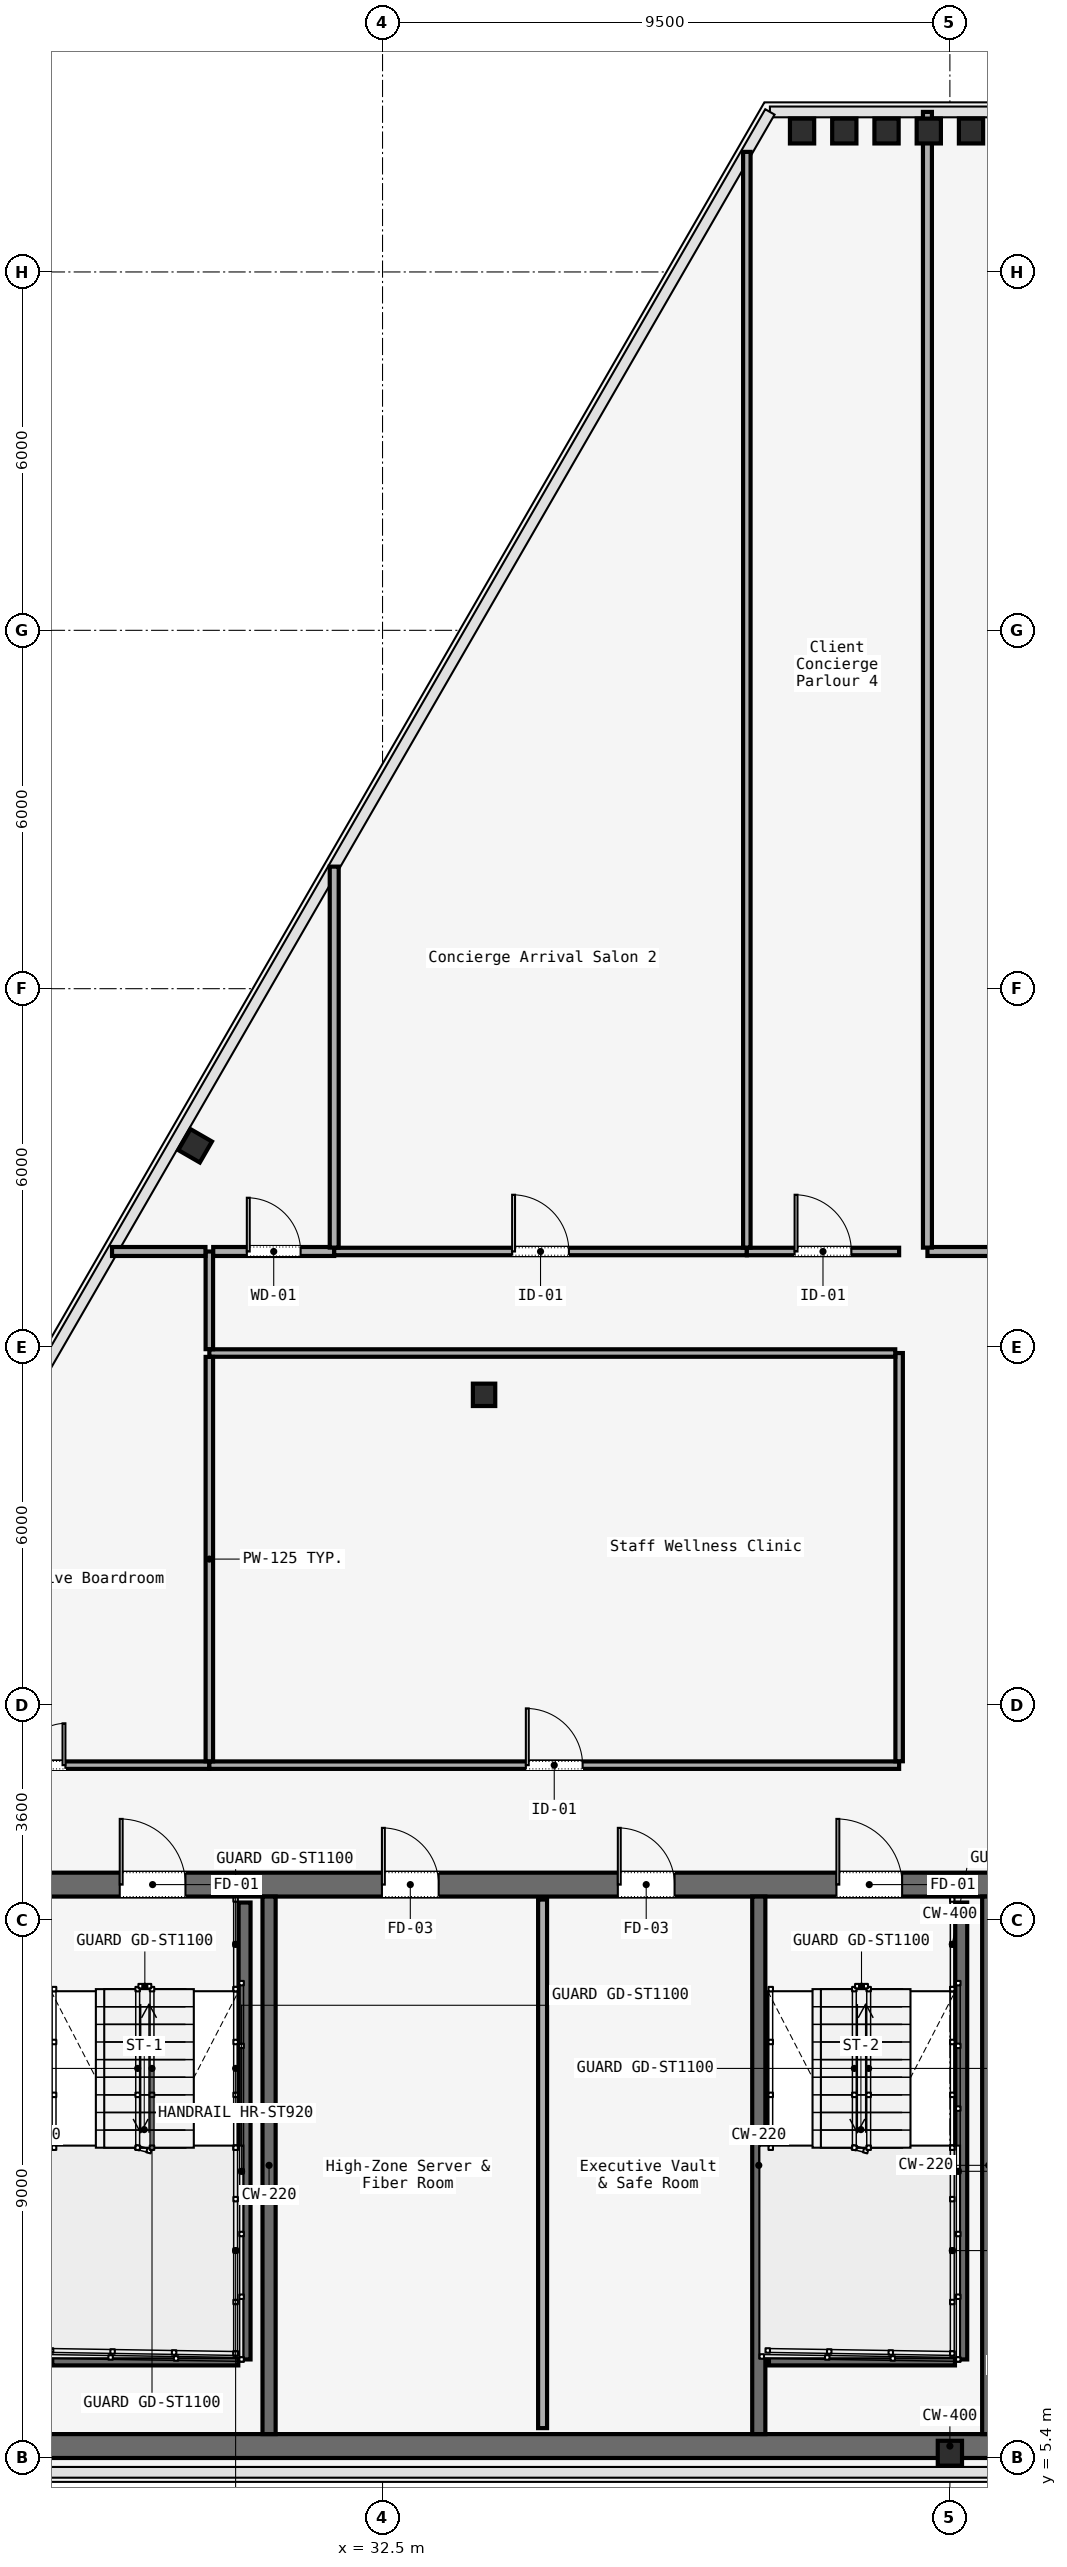
"""IFC4 building model, lengths in metres.
Left out: names, types, materials, properties, quantities, classifications, styles, units other than length and angle.
Written with IfcOpenShell. Run it as: python <this file> out.ifc"""

import sys

from ifc_helpers import new_model, si_unit, direction, frame, frame_2d, origin, origin_2d, place, context, subcontext, project, spatial, rectangle, i_section, extrude, element, fill, save


model = new_model("IFC4")
c1 = context("Model", 3, precision=1e-05, world=origin(), true_north=direction((0.0, 1.0)))
c2 = subcontext(c1, "Body", "Model", "MODEL_VIEW")
j1 = project(units=[si_unit("LENGTHUNIT", "METRE"), si_unit("PLANEANGLEUNIT", "RADIAN")], contexts=[c1])
p1 = place(None, origin())
s1 = spatial("IfcSite", under=j1, at=p1, CompositionType="ELEMENT")
p2 = place(p1, origin())
s2 = spatial("IfcBuilding", under=s1, at=p2, CompositionType="ELEMENT")
p3 = place(p2, frame((0.0, 0.0, 256.0)))
s3 = spatial("IfcBuildingStorey", under=s2, at=p3, CompositionType="ELEMENT", Elevation=256.0)
p4 = place(p3, frame((26.45, 15.0, 0.0), z_axis=(0.0, 0.0, 1.0), x_axis=(1.0, 0.0, 0.0)))
e1 = element("IfcWall", 1, at=p4, inside=s3, PredefinedType="SOLIDWALL", context=c2, shape_type="SweptSolid", body=[
    extrude(rectangle(XDim=31.1, YDim=0.4, at=frame_2d((15.55, 0.0))), origin(), (0.0, 0.0, 1.0), 3.58),
])
p5 = place(p4, frame((1.65, 0.0, 0.0)))
e2 = element("IfcOpeningElement", 2, at=p5, cuts=e1, PredefinedType="OPENING", context=c2, shape_type="SweptSolid", body=[
    extrude(rectangle(XDim=1.1, YDim=2.2, at=frame_2d((0.55, 1.1))), frame((0.0, 0.2, 0.0), z_axis=(0.0, -1.0, 0.0), x_axis=(1.0, 0.0, 0.0)), (0.0, 0.0, 1.0), 0.4),
])
p6 = place(p4, frame((13.65, 0.0, 0.0)))
e3 = element("IfcOpeningElement", 3, at=p6, cuts=e1, PredefinedType="OPENING", context=c2, shape_type="SweptSolid", body=[
    extrude(rectangle(XDim=1.1, YDim=2.2, at=frame_2d((0.55, 1.1))), frame((0.0, 0.2, 0.0), z_axis=(0.0, -1.0, 0.0), x_axis=(1.0, 0.0, 0.0)), (0.0, 0.0, 1.0), 0.4),
])
p7 = place(p4, frame((25.55, 0.0, 0.0)))
e4 = element("IfcOpeningElement", 4, at=p7, cuts=e1, PredefinedType="OPENING", context=c2, shape_type="SweptSolid", body=[
    extrude(rectangle(XDim=1.1, YDim=2.2, at=frame_2d((0.55, 1.1))), frame((0.0, 0.2, 0.0), z_axis=(0.0, -1.0, 0.0), x_axis=(1.0, 0.0, 0.0)), (0.0, 0.0, 1.0), 0.4),
])
p8 = place(p4, frame((19.35, 0.0, 0.0)))
e5 = element("IfcOpeningElement", 5, at=p8, cuts=e1, PredefinedType="OPENING", context=c2, shape_type="SweptSolid", body=[
    extrude(rectangle(XDim=1.1, YDim=2.2, at=frame_2d((0.55, 1.1))), frame((0.0, 0.2, 0.0), z_axis=(0.0, -1.0, 0.0), x_axis=(1.0, 0.0, 0.0)), (0.0, 0.0, 1.0), 0.4),
])
p9 = place(p4, frame((21.4, 0.0, 0.0)))
e6 = element("IfcOpeningElement", 6, at=p9, cuts=e1, PredefinedType="OPENING", context=c2, shape_type="SweptSolid", body=[
    extrude(rectangle(XDim=0.9, YDim=2.1, at=frame_2d((0.45, 1.05))), frame((0.0, 0.2, 0.0), z_axis=(0.0, -1.0, 0.0), x_axis=(1.0, 0.0, 0.0)), (0.0, 0.0, 1.0), 0.4),
])
p10 = place(p4, frame((6.04, 0.0, 0.0)))
e7 = element("IfcOpeningElement", 7, at=p10, cuts=e1, PredefinedType="OPENING", context=c2, shape_type="SweptSolid", body=[
    extrude(rectangle(XDim=0.95, YDim=2.2, at=frame_2d((0.475, 1.1))), frame((0.0, 0.2, 0.0), z_axis=(0.0, -1.0, 0.0), x_axis=(1.0, 0.0, 0.0)), (0.0, 0.0, 1.0), 0.4),
])
p11 = place(p4, frame((9.99, 0.0, 0.0)))
e8 = element("IfcOpeningElement", 8, at=p11, cuts=e1, PredefinedType="OPENING", context=c2, shape_type="SweptSolid", body=[
    extrude(rectangle(XDim=0.95, YDim=2.2, at=frame_2d((0.475, 1.1))), frame((0.0, 0.2, 0.0), z_axis=(0.0, -1.0, 0.0), x_axis=(1.0, 0.0, 0.0)), (0.0, 0.0, 1.0), 0.4),
])
p12 = place(p4, frame((23.35, 0.0, 0.0)))
e9 = element("IfcOpeningElement", 9, at=p12, cuts=e1, PredefinedType="OPENING", context=c2, shape_type="SweptSolid", body=[
    extrude(rectangle(XDim=1.3, YDim=2.3, at=frame_2d((0.65, 1.15))), frame((0.0, 0.2, 0.0), z_axis=(0.0, -1.0, 0.0), x_axis=(1.0, 0.0, 0.0)), (0.0, 0.0, 1.0), 0.4),
])
p13 = place(p3, frame((26.45, 5.6, 0.0), z_axis=(0.0, 0.0, 1.0), x_axis=(1.0, 0.0, 0.0)))
e10 = element("IfcWall", 10, at=p13, inside=s3, PredefinedType="SOLIDWALL", context=c2, shape_type="SweptSolid", body=[
    extrude(rectangle(XDim=31.1, YDim=0.4, at=frame_2d((15.55, 0.0))), origin(), (0.0, 0.0, 1.0), 3.58),
])
for number, where, z_axis, x_axis in (
    (11, (30.6, 5.8, 0.0), (0.0, 0.0, 1.0), (0.0, 1.0, 0.0)),
    (12, (38.8, 5.8, 0.0), (0.0, 0.0, 1.0), (0.0, 1.0, 0.0)),
    (13, (42.65, 5.8, 0.0), (0.0, 0.0, 1.0), (0.0, 1.0, 0.0)),
):
    element("IfcWall", number, at=place(p3, frame(where, z_axis=z_axis, x_axis=x_axis)), inside=s3, PredefinedType="SOLIDWALL", context=c2, shape_type="SweptSolid", body=[
        extrude(rectangle(XDim=9.0, YDim=0.22, at=frame_2d((4.5, 0.0))), origin(), (0.0, 0.0, 1.0), 3.58),
    ])
p14 = place(p3, frame((34.2, 23.2, 0.0), z_axis=(0.0, 0.0, 1.0), x_axis=(1.0, 0.0, 0.0)))
e14 = element("IfcColumn", 14, at=p14, inside=s3, PredefinedType="COLUMN", context=c2, shape_type="SweptSolid", body=[
    extrude(i_section(OverallWidth=0.375, OverallDepth=0.375, WebThickness=0.017, FlangeThickness=0.027, FilletRadius=0.015, at=origin_2d()), origin(), (0.0, 0.0, 1.0), 3.58),
])
for number, where, z_axis, x_axis in (
    (15, (42.0, 5.48, 0.0), (0.0, 0.0, 1.0), (1.0, 0.0, 0.0)),
    (16, (42.354, 44.36, 0.0), (0.0, 0.0, 1.0), (1.0, 0.0, 0.0)),
    (17, (41.646, 44.36, 0.0), (0.0, 0.0, 1.0), (1.0, 0.0, 0.0)),
    (18, (40.939, 44.36, 0.0), (0.0, 0.0, 1.0), (1.0, 0.0, 0.0)),
    (19, (40.232, 44.36, 0.0), (0.0, 0.0, 1.0), (1.0, 0.0, 0.0)),
    (20, (39.525, 44.36, 0.0), (0.0, 0.0, 1.0), (1.0, 0.0, 0.0)),
    (21, (29.362, 27.37, 0.0), (0.0, 0.0, 1.0), (0.5, 0.866, 0.0)),
):
    element("IfcColumn", number, at=place(p3, frame(where, z_axis=z_axis, x_axis=x_axis)), inside=s3, PredefinedType="COLUMN", context=c2, shape_type="SweptSolid", body=[
        extrude(i_section(OverallWidth=0.406, OverallDepth=0.416, WebThickness=0.03, FlangeThickness=0.037, FilletRadius=0.015, at=origin_2d()), origin(), (0.0, 0.0, 1.0), 3.58),
    ])
p15 = place(p3, frame((30.19, 14.7, 0.0), z_axis=(0.0, 0.0, 1.0), x_axis=(0.0, -1.0, 0.0)))
e22 = element("IfcWall", 22, at=p15, inside=s3, PredefinedType="SOLIDWALL", context=c2, shape_type="SweptSolid", body=[
    extrude(rectangle(XDim=7.65, YDim=0.2, at=frame_2d((3.825, 0.0))), origin(), (0.0, 0.0, 1.0), 3.8),
])
p16 = place(p3, frame((26.97, 7.05, 0.0), z_axis=(0.0, 0.0, 1.0), x_axis=(1.0, 0.0, 0.0)))
e23 = element("IfcWall", 23, at=p16, inside=s3, PredefinedType="SOLIDWALL", context=c2, shape_type="SweptSolid", body=[
    extrude(rectangle(XDim=3.115, YDim=0.2, at=frame_2d((1.558, 0.0))), origin(), (0.0, 0.0, 1.0), 3.8),
])
p17 = place(p3, frame((42.19, 14.7, 0.0), z_axis=(0.0, 0.0, 1.0), x_axis=(0.0, -1.0, 0.0)))
e24 = element("IfcWall", 24, at=p17, inside=s3, PredefinedType="SOLIDWALL", context=c2, shape_type="SweptSolid", body=[
    extrude(rectangle(XDim=7.65, YDim=0.2, at=frame_2d((3.825, 0.0))), origin(), (0.0, 0.0, 1.0), 3.8),
])
p18 = place(p3, frame((38.97, 7.05, 0.0), z_axis=(0.0, 0.0, 1.0), x_axis=(1.0, 0.0, 0.0)))
e25 = element("IfcWall", 25, at=p18, inside=s3, PredefinedType="SOLIDWALL", context=c2, shape_type="SweptSolid", body=[
    extrude(rectangle(XDim=3.115, YDim=0.2, at=frame_2d((1.558, 0.0))), origin(), (0.0, 0.0, 1.0), 3.8),
])
p19 = place(p3, frame((35.18, 5.9, 0.0), z_axis=(0.0, 0.0, 1.0), x_axis=(0.0, 1.0, 0.0)))
e26 = element("IfcWall", 26, at=p19, inside=s3, PredefinedType="PARTITIONING", context=c2, shape_type="SweptSolid", body=[
    extrude(rectangle(XDim=8.85, YDim=0.15, at=frame_2d((4.425, 0.0))), origin(), (0.0, 0.0, 1.0), 3.01),
])
p20 = place(p3, frame((23.38, 17.0, 0.0), z_axis=(0.0, 0.0, 1.0), x_axis=(1.0, 0.0, 0.0)))
e27 = element("IfcWall", 27, at=p20, inside=s3, PredefinedType="PARTITIONING", context=c2, shape_type="SweptSolid", body=[
    extrude(rectangle(XDim=6.22, YDim=0.125, at=frame_2d((3.11, 0.0))), origin(), (0.0, 0.0, 1.0), 3.01),
])
p21 = place(p20, frame((2.41, 0.0, 0.0)))
e28 = element("IfcOpeningElement", 28, at=p21, cuts=e27, PredefinedType="OPENING", context=c2, shape_type="SweptSolid", body=[
    extrude(rectangle(XDim=1.4, YDim=2.2, at=frame_2d((0.7, 1.1))), frame((0.0, 0.062, 0.0), z_axis=(0.0, -1.0, 0.0), x_axis=(1.0, 0.0, 0.0)), (0.0, 0.0, 1.0), 0.125),
])
p22 = place(p3, frame((29.6, 17.0, 0.0), z_axis=(0.0, 0.0, 1.0), x_axis=(1.0, 0.0, 0.0)))
e29 = element("IfcWall", 29, at=p22, inside=s3, PredefinedType="PARTITIONING", context=c2, shape_type="SweptSolid", body=[
    extrude(rectangle(XDim=11.55, YDim=0.125, at=frame_2d((5.775, 0.0))), origin(), (0.0, 0.0, 1.0), 3.01),
])
p23 = place(p22, frame((5.3, 0.0, 0.0)))
e30 = element("IfcOpeningElement", 30, at=p23, cuts=e29, PredefinedType="OPENING", context=c2, shape_type="SweptSolid", body=[
    extrude(rectangle(XDim=0.95, YDim=2.2, at=frame_2d((0.475, 1.1))), frame((0.0, 0.062, 0.0), z_axis=(0.0, -1.0, 0.0), x_axis=(1.0, 0.0, 0.0)), (0.0, 0.0, 1.0), 0.125),
])
p24 = place(p3, frame((41.15, 17.065, 0.0), z_axis=(0.0, 0.0, 1.0), x_axis=(0.0, 1.0, 0.0)))
e31 = element("IfcWall", 31, at=p24, inside=s3, PredefinedType="PARTITIONING", context=c2, shape_type="SweptSolid", body=[
    extrude(rectangle(XDim=6.835, YDim=0.125, at=frame_2d((3.417, 0.0))), origin(), (0.0, 0.0, 1.0), 3.01),
])
p25 = place(p3, frame((41.085, 23.9, 0.0), z_axis=(0.0, 0.0, 1.0), x_axis=(-1.0, 0.0, 0.0)))
e32 = element("IfcWall", 32, at=p25, inside=s3, PredefinedType="PARTITIONING", context=c2, shape_type="SweptSolid", body=[
    extrude(rectangle(XDim=11.485, YDim=0.125, at=frame_2d((5.742, 0.0))), origin(), (0.0, 0.0, 1.0), 3.01),
])
p26 = place(p3, frame((29.6, 23.965, 0.0), z_axis=(0.0, 0.0, 1.0), x_axis=(0.0, 1.0, 0.0)))
e33 = element("IfcWall", 33, at=p26, inside=s3, PredefinedType="PARTITIONING", context=c2, shape_type="SweptSolid", body=[
    extrude(rectangle(XDim=1.635, YDim=0.125, at=frame_2d((0.817, 0.0))), origin(), (0.0, 0.0, 1.0), 3.01),
])
p27 = place(p3, frame((29.665, 25.6, 0.0), z_axis=(0.0, 0.0, 1.0), x_axis=(1.0, 0.0, 0.0)))
e34 = element("IfcWall", 34, at=p27, inside=s3, PredefinedType="PARTITIONING", context=c2, shape_type="SweptSolid", body=[
    extrude(rectangle(XDim=2.026, YDim=0.15, at=frame_2d((1.013, 0.0))), origin(), (0.0, 0.0, 1.0), 3.01),
])
p28 = place(p27, frame((0.563, 0.0, 0.0)))
e35 = element("IfcOpeningElement", 35, at=p28, cuts=e34, PredefinedType="OPENING", context=c2, shape_type="SweptSolid", body=[
    extrude(rectangle(XDim=0.9, YDim=2.15, at=frame_2d((0.45, 1.075))), frame((0.0, 0.075, 0.0), z_axis=(0.0, -1.0, 0.0), x_axis=(1.0, 0.0, 0.0)), (0.0, 0.0, 1.0), 0.15),
])
p29 = place(p3, frame((31.691, 25.6, 0.0), z_axis=(0.0, 0.0, 1.0), x_axis=(1.0, 0.0, 0.0)))
e36 = element("IfcWall", 36, at=p29, inside=s3, PredefinedType="PARTITIONING", context=c2, shape_type="SweptSolid", body=[
    extrude(rectangle(XDim=6.909, YDim=0.125, at=frame_2d((3.455, 0.0))), origin(), (0.0, 0.0, 1.0), 3.01),
])
p30 = place(p29, frame((2.979, 0.0, 0.0)))
e37 = element("IfcOpeningElement", 37, at=p30, cuts=e36, PredefinedType="OPENING", context=c2, shape_type="SweptSolid", body=[
    extrude(rectangle(XDim=0.95, YDim=2.2, at=frame_2d((0.475, 1.1))), frame((0.0, 0.062, 0.0), z_axis=(0.0, -1.0, 0.0), x_axis=(1.0, 0.0, 0.0)), (0.0, 0.0, 1.0), 0.125),
])
p31 = place(p3, frame((38.6, 25.6, 0.0), z_axis=(0.0, 0.0, 1.0), x_axis=(1.0, 0.0, 0.0)))
e38 = element("IfcWall", 38, at=p31, inside=s3, PredefinedType="PARTITIONING", context=c2, shape_type="SweptSolid", body=[
    extrude(rectangle(XDim=2.55, YDim=0.125, at=frame_2d((1.275, 0.0))), origin(), (0.0, 0.0, 1.0), 3.01),
])
p32 = place(p31, frame((0.8, 0.0, 0.0)))
e39 = element("IfcOpeningElement", 39, at=p32, cuts=e38, PredefinedType="OPENING", context=c2, shape_type="SweptSolid", body=[
    extrude(rectangle(XDim=0.95, YDim=2.2, at=frame_2d((0.475, 1.1))), frame((0.0, 0.062, 0.0), z_axis=(0.0, -1.0, 0.0), x_axis=(1.0, 0.0, 0.0)), (0.0, 0.0, 1.0), 0.125),
])
p33 = place(p3, frame((41.624, 25.6, 0.0), z_axis=(0.0, 0.0, 1.0), x_axis=(1.0, 0.0, 0.0)))
e40 = element("IfcWall", 40, at=p33, inside=s3, PredefinedType="PARTITIONING", context=c2, shape_type="SweptSolid", body=[
    extrude(rectangle(XDim=1.226, YDim=0.15, at=frame_2d((0.613, 0.0))), origin(), (0.0, 0.0, 1.0), 3.01),
])
p34 = place(p3, frame((29.6, 23.835, 0.0), z_axis=(0.0, 0.0, 1.0), x_axis=(0.0, -1.0, 0.0)))
e41 = element("IfcWall", 41, at=p34, inside=s3, PredefinedType="PARTITIONING", context=c2, shape_type="SweptSolid", body=[
    extrude(rectangle(XDim=6.77, YDim=0.125, at=frame_2d((3.385, 0.0))), origin(), (0.0, 0.0, 1.0), 3.01),
])
p35 = place(p3, frame((27.971, 25.6, 0.0), z_axis=(0.0, 0.0, 1.0), x_axis=(1.0, 0.0, 0.0)))
e42 = element("IfcWall", 42, at=p35, inside=s3, PredefinedType="PARTITIONING", context=c2, shape_type="SweptSolid", body=[
    extrude(rectangle(XDim=1.564, YDim=0.15, at=frame_2d((0.782, 0.0))), origin(), (0.0, 0.0, 1.0), 3.01),
])
p36 = place(p3, frame((31.691, 32.044, 0.0), z_axis=(0.0, 0.0, 1.0), x_axis=(0.0, -1.0, 0.0)))
e43 = element("IfcWall", 43, at=p36, inside=s3, PredefinedType="PARTITIONING", context=c2, shape_type="SweptSolid", body=[
    extrude(rectangle(XDim=6.379, YDim=0.15, at=frame_2d((3.189, 0.0))), origin(), (0.0, 0.0, 1.0), 3.01),
])
p37 = place(p3, frame((38.6, 44.01, 0.0), z_axis=(0.0, 0.0, 1.0), x_axis=(0.0, -1.0, 0.0)))
e44 = element("IfcWall", 44, at=p37, inside=s3, PredefinedType="PARTITIONING", context=c2, shape_type="SweptSolid", body=[
    extrude(rectangle(XDim=18.345, YDim=0.125, at=frame_2d((9.173, 0.0))), origin(), (0.0, 0.0, 1.0), 3.01),
])
p38 = place(p3, frame((41.624, 25.665, 0.0), z_axis=(0.0, 0.0, 1.0), x_axis=(0.0, 1.0, 0.0)))
e45 = element("IfcWall", 45, at=p38, inside=s3, PredefinedType="PARTITIONING", context=c2, shape_type="SweptSolid", body=[
    extrude(rectangle(XDim=19.014, YDim=0.15, at=frame_2d((9.507, 0.0))), origin(), (0.0, 0.0, 1.0), 3.01),
])
p39 = place(p5, origin())
e46 = element("IfcDoor", 46, at=p39, inside=s3, OperationType="SINGLE_SWING_LEFT", PredefinedType="DOOR", context=c2, shape_type="SweptSolid", body=[
    extrude(rectangle(XDim=1.1, YDim=2.2, at=frame_2d((0.55, 1.1))), frame((0.0, 0.025, 0.0), z_axis=(0.0, -1.0, 0.0), x_axis=(1.0, 0.0, 0.0)), (0.0, 0.0, 1.0), 0.05),
])
fill(e2, e46)
p40 = place(p6, origin())
e47 = element("IfcDoor", 47, at=p40, inside=s3, OperationType="SINGLE_SWING_RIGHT", PredefinedType="DOOR", context=c2, shape_type="SweptSolid", body=[
    extrude(rectangle(XDim=1.1, YDim=2.2, at=frame_2d((0.55, 1.1))), frame((0.0, 0.025, 0.0), z_axis=(0.0, -1.0, 0.0), x_axis=(1.0, 0.0, 0.0)), (0.0, 0.0, 1.0), 0.05),
])
fill(e3, e47)
p41 = place(p10, origin())
e48 = element("IfcDoor", 48, at=p41, inside=s3, OperationType="SINGLE_SWING_LEFT", PredefinedType="DOOR", context=c2, shape_type="SweptSolid", body=[
    extrude(rectangle(XDim=0.95, YDim=2.2, at=frame_2d((0.475, 1.1))), frame((0.0, 0.025, 0.0), z_axis=(0.0, -1.0, 0.0), x_axis=(1.0, 0.0, 0.0)), (0.0, 0.0, 1.0), 0.05),
])
fill(e7, e48)
p42 = place(p11, origin())
e49 = element("IfcDoor", 49, at=p42, inside=s3, OperationType="SINGLE_SWING_RIGHT", PredefinedType="DOOR", context=c2, shape_type="SweptSolid", body=[
    extrude(rectangle(XDim=0.95, YDim=2.2, at=frame_2d((0.475, 1.1))), frame((0.0, 0.025, 0.0), z_axis=(0.0, -1.0, 0.0), x_axis=(1.0, 0.0, 0.0)), (0.0, 0.0, 1.0), 0.05),
])
fill(e8, e49)
p43 = place(p21, origin())
e50 = element("IfcDoor", 50, at=p43, inside=s3, OperationType="SINGLE_SWING_LEFT", PredefinedType="DOOR", context=c2, shape_type="SweptSolid", body=[
    extrude(rectangle(XDim=1.4, YDim=2.2, at=frame_2d((0.7, 1.1))), frame((0.0, 0.025, 0.0), z_axis=(0.0, -1.0, 0.0), x_axis=(1.0, 0.0, 0.0)), (0.0, 0.0, 1.0), 0.05),
])
fill(e28, e50)
p44 = place(p23, origin())
e51 = element("IfcDoor", 51, at=p44, inside=s3, OperationType="SINGLE_SWING_RIGHT", PredefinedType="DOOR", context=c2, shape_type="SweptSolid", body=[
    extrude(rectangle(XDim=0.95, YDim=2.2, at=frame_2d((0.475, 1.1))), frame((0.0, 0.025, 0.0), z_axis=(0.0, -1.0, 0.0), x_axis=(1.0, 0.0, 0.0)), (0.0, 0.0, 1.0), 0.05),
])
fill(e30, e51)
p45 = place(p28, origin())
e52 = element("IfcDoor", 52, at=p45, inside=s3, OperationType="SINGLE_SWING_LEFT", PredefinedType="DOOR", context=c2, shape_type="SweptSolid", body=[
    extrude(rectangle(XDim=0.9, YDim=2.15, at=frame_2d((0.45, 1.075))), frame((0.0, 0.025, 0.0), z_axis=(0.0, -1.0, 0.0), x_axis=(1.0, 0.0, 0.0)), (0.0, 0.0, 1.0), 0.05),
])
fill(e35, e52)
p46 = place(p30, origin())
e53 = element("IfcDoor", 53, at=p46, inside=s3, OperationType="SINGLE_SWING_LEFT", PredefinedType="DOOR", context=c2, shape_type="SweptSolid", body=[
    extrude(rectangle(XDim=0.95, YDim=2.2, at=frame_2d((0.475, 1.1))), frame((0.0, 0.025, 0.0), z_axis=(0.0, -1.0, 0.0), x_axis=(1.0, 0.0, 0.0)), (0.0, 0.0, 1.0), 0.05),
])
fill(e37, e53)
p47 = place(p32, origin())
e54 = element("IfcDoor", 54, at=p47, inside=s3, OperationType="SINGLE_SWING_RIGHT", PredefinedType="DOOR", context=c2, shape_type="SweptSolid", body=[
    extrude(rectangle(XDim=0.95, YDim=2.2, at=frame_2d((0.475, 1.1))), frame((0.0, 0.025, 0.0), z_axis=(0.0, -1.0, 0.0), x_axis=(1.0, 0.0, 0.0)), (0.0, 0.0, 1.0), 0.05),
])
fill(e39, e54)
save(model, sys.argv[1])
